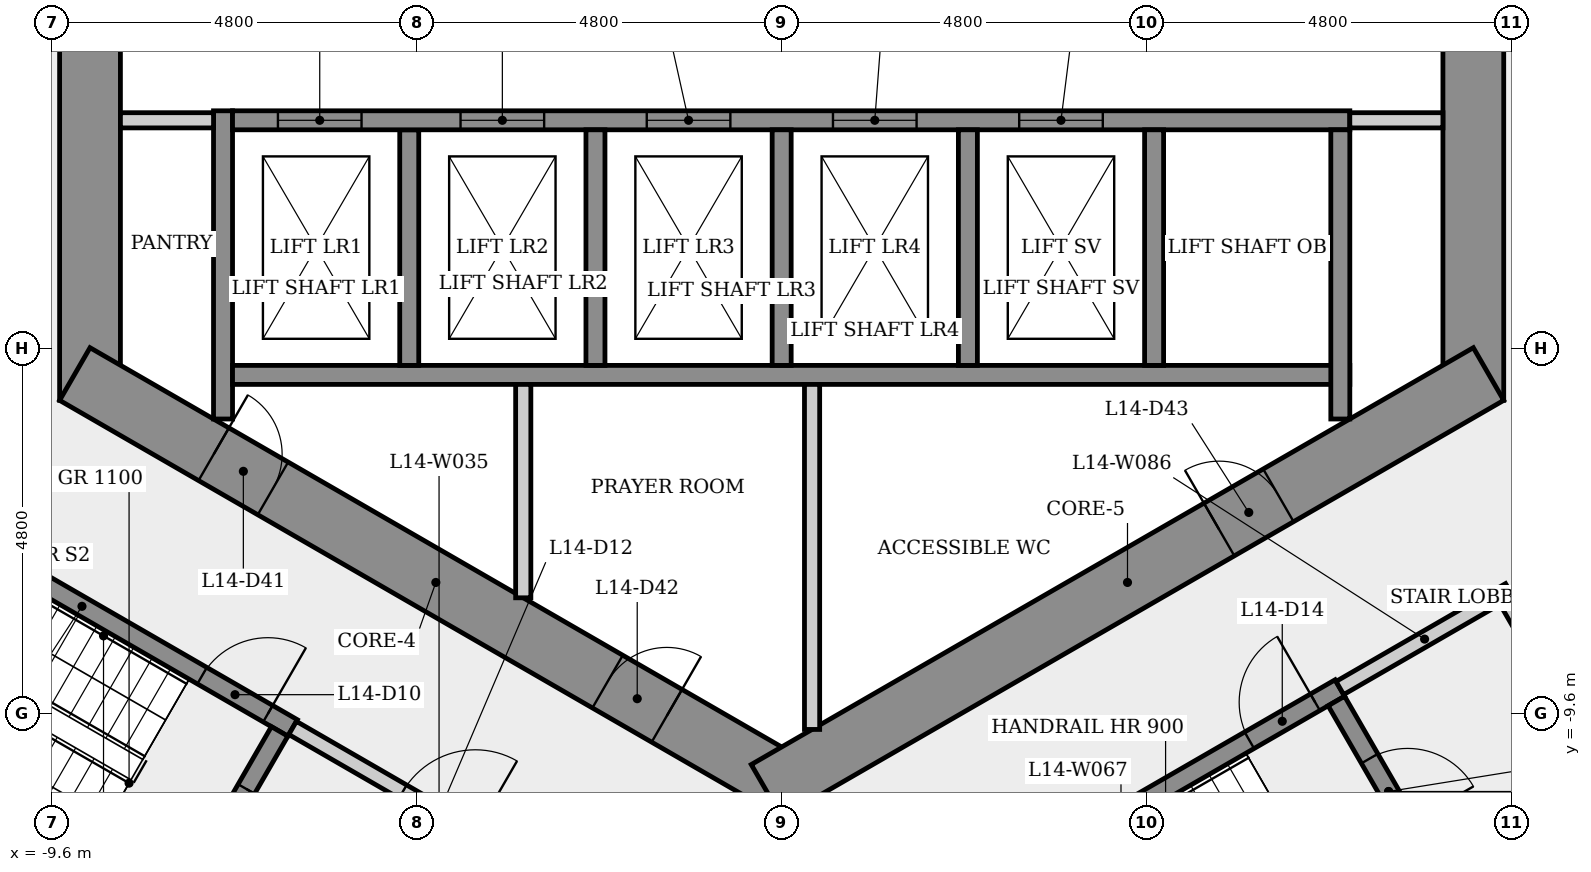
"""IFC4 building model, lengths in metres.
Left out: names, types, materials, properties, quantities, classifications, styles, units other than length and angle.
Written with IfcOpenShell. Run it as: python <this file> out.ifc"""

import sys

from ifc_helpers import new_model, si_unit, direction, frame, frame_2d, origin, place, context, subcontext, project, spatial, rectangle, extrude, element, fill, save


model = new_model("IFC4")
c1 = context("Model", 3, precision=1e-05, world=origin(), true_north=direction((0.0, 1.0)))
c2 = subcontext(c1, "Body", "Model", "MODEL_VIEW")
j1 = project(units=[si_unit("LENGTHUNIT", "METRE"), si_unit("PLANEANGLEUNIT", "RADIAN")], contexts=[c1])
p1 = place(None, origin())
s1 = spatial("IfcSite", under=j1, at=p1, CompositionType="ELEMENT")
p2 = place(p1, origin())
s2 = spatial("IfcBuilding", under=s1, at=p2, CompositionType="ELEMENT")
p3 = place(p2, frame((0.0, 0.0, 56.1)))
s3 = spatial("IfcBuildingStorey", under=s2, at=p3, CompositionType="ELEMENT", Elevation=56.1)
p4 = place(p3, frame((9.1, -5.485, 0.0), z_axis=(0.0, 0.0, 1.0), x_axis=(0.0, 1.0, 0.0)))
e1 = element("IfcWall", 1, at=p4, inside=s3, PredefinedType="SHEAR", context=c2, shape_type="SweptSolid", body=[
    extrude(rectangle(XDim=10.97, YDim=0.8, at=frame_2d((5.485, 0.0))), origin(), (0.0, 0.0, 1.0), 3.4),
])
p5 = place(p4, frame((4.685, 0.0, 0.0)))
e2 = element("IfcOpeningElement", 2, at=p5, cuts=e1, PredefinedType="OPENING", context=c2, shape_type="SweptSolid", body=[
    extrude(rectangle(XDim=1.6, YDim=2.1, at=frame_2d((0.8, 1.05))), frame((0.0, 0.41, 0.0), z_axis=(0.0, -1.0, 0.0), x_axis=(1.0, 0.0, 0.0)), (0.0, 0.0, 1.0), 0.82),
])
p6 = place(p3, frame((-9.1, 5.485, 0.0), z_axis=(0.0, 0.0, 1.0), x_axis=(0.0, -1.0, 0.0)))
e3 = element("IfcWall", 3, at=p6, inside=s3, PredefinedType="SHEAR", context=c2, shape_type="SweptSolid", body=[
    extrude(rectangle(XDim=10.97, YDim=0.8, at=frame_2d((5.485, 0.0))), origin(), (0.0, 0.0, 1.0), 3.4),
])
p7 = place(p6, frame((4.685, 0.0, 0.0)))
e4 = element("IfcOpeningElement", 4, at=p7, cuts=e3, PredefinedType="OPENING", context=c2, shape_type="SweptSolid", body=[
    extrude(rectangle(XDim=1.6, YDim=2.1, at=frame_2d((0.8, 1.05))), frame((0.0, 0.41, 0.0), z_axis=(0.0, -1.0, 0.0), x_axis=(1.0, 0.0, 0.0)), (0.0, 0.0, 1.0), 0.82),
])
p8 = place(p3, frame((-9.3, -5.138, 0.0), z_axis=(0.0, 0.0, 1.0), x_axis=(0.866023993627, -0.500002442456, 0.0)))
e5 = element("IfcWall", 5, at=p8, inside=s3, PredefinedType="SHEAR", context=c2, shape_type="SweptSolid", body=[
    extrude(rectangle(XDim=10.97, YDim=0.8, at=frame_2d((5.485, 0.0))), origin(), (0.0, 0.0, 1.0), 3.4),
])
p9 = place(p8, frame((2.11, 0.0, 0.0)))
e6 = element("IfcOpeningElement", 6, at=p9, cuts=e5, PredefinedType="OPENING", context=c2, shape_type="SweptSolid", body=[
    extrude(rectangle(XDim=0.9, YDim=2.1, at=frame_2d((0.45, 1.05))), frame((0.0, 0.41, 0.0), z_axis=(0.0, -1.0, 0.0), x_axis=(1.0, 0.0, 0.0)), (0.0, 0.0, 1.0), 0.82),
])
p10 = place(p8, frame((8.094, 0.0, 0.0)))
e7 = element("IfcOpeningElement", 7, at=p10, cuts=e5, PredefinedType="OPENING", context=c2, shape_type="SweptSolid", body=[
    extrude(rectangle(XDim=0.9, YDim=2.1, at=frame_2d((0.45, 1.05))), frame((0.0, 0.41, 0.0), z_axis=(0.0, -1.0, 0.0), x_axis=(1.0, 0.0, 0.0)), (0.0, 0.0, 1.0), 0.82),
])
p11 = place(p3, frame((-0.2, -10.623, 0.0), z_axis=(0.0, 0.0, 1.0), x_axis=(0.866023993627, 0.500002442456, 0.0)))
e8 = element("IfcWall", 8, at=p11, inside=s3, PredefinedType="SHEAR", context=c2, shape_type="SweptSolid", body=[
    extrude(rectangle(XDim=10.97, YDim=0.8, at=frame_2d((5.485, 0.0))), origin(), (0.0, 0.0, 1.0), 3.4),
])
p12 = place(p11, frame((6.877, 0.0, 0.0)))
e9 = element("IfcOpeningElement", 9, at=p12, cuts=e8, PredefinedType="OPENING", context=c2, shape_type="SweptSolid", body=[
    extrude(rectangle(XDim=0.9, YDim=2.1, at=frame_2d((0.45, 1.05))), frame((0.0, 0.41, 0.0), z_axis=(0.0, -1.0, 0.0), x_axis=(1.0, 0.0, 0.0)), (0.0, 0.0, 1.0), 0.82),
])
p13 = place(p3, frame((-11.977, -6.595, 0.0), z_axis=(0.0, 0.0, 1.0), x_axis=(0.866025499775, -0.499999833739, 0.0)))
e10 = element("IfcWall", 10, at=p13, inside=s3, PredefinedType="SHEAR", context=c2, shape_type="SweptSolid", body=[
    extrude(rectangle(XDim=6.4, YDim=0.25, at=frame_2d((3.2, 0.0))), origin(), (0.0, 0.0, 1.0), 3.05),
])
p14 = place(p13, frame((5.025, 0.0, 0.0)))
e11 = element("IfcOpeningElement", 11, at=p14, cuts=e10, PredefinedType="OPENING", context=c2, shape_type="SweptSolid", body=[
    extrude(rectangle(XDim=1.0, YDim=2.1, at=frame_2d((0.5, 1.05))), frame((0.0, 0.135, 0.0), z_axis=(0.0, -1.0, 0.0), x_axis=(1.0, 0.0, 0.0)), (0.0, 0.0, 1.0), 0.27),
])
p15 = place(p3, frame((-7.935, -12.393, 0.0), z_axis=(0.0, 0.0, 1.0), x_axis=(-0.866025499775, 0.499999833739, 0.0)))
e12 = element("IfcWall", 12, at=p15, inside=s3, PredefinedType="SHEAR", context=c2, shape_type="SweptSolid", body=[
    extrude(rectangle(XDim=6.4, YDim=0.25, at=frame_2d((3.2, 0.0))), origin(), (0.0, 0.0, 1.0), 3.05),
])
p16 = place(p3, frame((-7.35, -5.73, 0.0), z_axis=(0.0, 0.0, 1.0), x_axis=(0.0, 1.0, 0.0)))
e13 = element("IfcWall", 13, at=p16, inside=s3, PredefinedType="SHEAR", context=c2, shape_type="SweptSolid", body=[
    extrude(rectangle(XDim=4.055, YDim=0.25, at=frame_2d((2.028, 0.0))), origin(), (0.0, 0.0, 1.0), 3.05),
])
p17 = place(p3, frame((-7.475, -1.8, 0.0), z_axis=(0.0, 0.0, 1.0), x_axis=(-1.0, 0.0, 0.0)))
e14 = element("IfcWall", 14, at=p17, inside=s3, PredefinedType="PARTITIONING", context=c2, shape_type="SweptSolid", body=[
    extrude(rectangle(XDim=1.225, YDim=0.2, at=frame_2d((0.613, 0.0))), origin(), (0.0, 0.0, 1.0), 3.05),
])
p18 = place(p3, frame((-6.605, -9.841, 0.0), z_axis=(0.0, 0.0, 1.0), x_axis=(-0.499996545922, -0.866027397988, 0.0)))
e15 = element("IfcWall", 15, at=p18, inside=s3, PredefinedType="SHEAR", context=c2, shape_type="SweptSolid", body=[
    extrude(rectangle(XDim=2.75, YDim=0.25, at=frame_2d((1.375, 0.0))), origin(), (0.0, 0.0, 1.0), 3.05),
])
p19 = place(p18, frame((0.875, 0.0, 0.0)))
e16 = element("IfcOpeningElement", 16, at=p19, cuts=e15, PredefinedType="OPENING", context=c2, shape_type="SweptSolid", body=[
    extrude(rectangle(XDim=1.0, YDim=2.1, at=frame_2d((0.5, 1.05))), frame((0.0, 0.135, 0.0), z_axis=(0.0, -1.0, 0.0), x_axis=(1.0, 0.0, 0.0)), (0.0, 0.0, 1.0), 0.27),
])
p20 = place(p3, frame((-6.435, -9.795, 0.0), z_axis=(0.0, 0.0, 1.0), x_axis=(0.866012907634, -0.500021643343, 0.0)))
e17 = element("IfcWall", 17, at=p20, inside=s3, PredefinedType="PARTITIONING", context=c2, shape_type="SweptSolid", body=[
    extrude(rectangle(XDim=4.45, YDim=0.2, at=frame_2d((2.225, 0.0))), origin(), (0.0, 0.0, 1.0), 3.05),
])
p21 = place(p20, frame((1.675, 0.0, 0.0)))
e18 = element("IfcOpeningElement", 18, at=p21, cuts=e17, PredefinedType="OPENING", context=c2, shape_type="SweptSolid", body=[
    extrude(rectangle(XDim=1.1, YDim=2.1, at=frame_2d((0.55, 1.05))), frame((0.0, 0.11, 0.0), z_axis=(0.0, -1.0, 0.0), x_axis=(1.0, 0.0, 0.0)), (0.0, 0.0, 1.0), 0.22),
])
p22 = place(p3, frame((-7.225, -5.15, 0.0), z_axis=(0.0, 0.0, 1.0), x_axis=(1.0, 0.0, 0.0)))
e19 = element("IfcWall", 19, at=p22, inside=s3, PredefinedType="SHEAR", context=c2, shape_type="SweptSolid", body=[
    extrude(rectangle(XDim=14.7, YDim=0.25, at=frame_2d((7.35, 0.0))), origin(), (0.0, 0.0, 1.0), 3.05),
])
p23 = place(p3, frame((-4.9, -1.925, 0.0), z_axis=(0.0, 0.0, 1.0), x_axis=(0.0, -1.0, 0.0)))
e20 = element("IfcWall", 20, at=p23, inside=s3, PredefinedType="SHEAR", context=c2, shape_type="SweptSolid", body=[
    extrude(rectangle(XDim=3.1, YDim=0.25, at=frame_2d((1.55, 0.0))), origin(), (0.0, 0.0, 1.0), 3.4),
])
p24 = place(p3, frame((-7.225, -1.8, 0.0), z_axis=(0.0, 0.0, 1.0), x_axis=(1.0, 0.0, 0.0)))
e21 = element("IfcWall", 21, at=p24, inside=s3, PredefinedType="SHEAR", context=c2, shape_type="SweptSolid", body=[
    extrude(rectangle(XDim=14.7, YDim=0.25, at=frame_2d((7.35, 0.0))), origin(), (0.0, 0.0, 1.0), 3.05),
])
p25 = place(p24, frame((0.597, 0.0, 0.0)))
e22 = element("IfcOpeningElement", 22, at=p25, cuts=e21, PredefinedType="OPENING", context=c2, shape_type="SweptSolid", body=[
    extrude(rectangle(XDim=1.1, YDim=2.1, at=frame_2d((0.55, 1.05))), frame((0.0, 0.135, 0.0), z_axis=(0.0, -1.0, 0.0), x_axis=(1.0, 0.0, 0.0)), (0.0, 0.0, 1.0), 0.27),
])
p26 = place(p24, frame((3.0, 0.0, 0.0)))
e23 = element("IfcOpeningElement", 23, at=p26, cuts=e21, PredefinedType="OPENING", context=c2, shape_type="SweptSolid", body=[
    extrude(rectangle(XDim=1.1, YDim=2.1, at=frame_2d((0.55, 1.05))), frame((0.0, 0.135, 0.0), z_axis=(0.0, -1.0, 0.0), x_axis=(1.0, 0.0, 0.0)), (0.0, 0.0, 1.0), 0.27),
])
p27 = place(p24, frame((5.45, 0.0, 0.0)))
e24 = element("IfcOpeningElement", 24, at=p27, cuts=e21, PredefinedType="OPENING", context=c2, shape_type="SweptSolid", body=[
    extrude(rectangle(XDim=1.1, YDim=2.1, at=frame_2d((0.55, 1.05))), frame((0.0, 0.135, 0.0), z_axis=(0.0, -1.0, 0.0), x_axis=(1.0, 0.0, 0.0)), (0.0, 0.0, 1.0), 0.27),
])
p28 = place(p24, frame((7.9, 0.0, 0.0)))
e25 = element("IfcOpeningElement", 25, at=p28, cuts=e21, PredefinedType="OPENING", context=c2, shape_type="SweptSolid", body=[
    extrude(rectangle(XDim=1.1, YDim=2.1, at=frame_2d((0.55, 1.05))), frame((0.0, 0.135, 0.0), z_axis=(0.0, -1.0, 0.0), x_axis=(1.0, 0.0, 0.0)), (0.0, 0.0, 1.0), 0.27),
])
p29 = place(p24, frame((10.35, 0.0, 0.0)))
e26 = element("IfcOpeningElement", 26, at=p29, cuts=e21, PredefinedType="OPENING", context=c2, shape_type="SweptSolid", body=[
    extrude(rectangle(XDim=1.1, YDim=2.1, at=frame_2d((0.55, 1.05))), frame((0.0, 0.135, 0.0), z_axis=(0.0, -1.0, 0.0), x_axis=(1.0, 0.0, 0.0)), (0.0, 0.0, 1.0), 0.27),
])
p30 = place(p3, frame((-3.4, -5.275, 0.0), z_axis=(0.0, 0.0, 1.0), x_axis=(0.0, -1.0, 0.0)))
e27 = element("IfcWall", 27, at=p30, inside=s3, PredefinedType="PARTITIONING", context=c2, shape_type="SweptSolid", body=[
    extrude(rectangle(XDim=2.808, YDim=0.2, at=frame_2d((1.404, 0.0))), origin(), (0.0, 0.0, 1.0), 3.05),
])
for number, where, z_axis, x_axis in (
    (28, (-2.45, -1.925, 0.0), (0.0, 0.0, 1.0), (0.0, -1.0, 0.0)),
    (29, (0.0, -1.925, 0.0), (0.0, 0.0, 1.0), (0.0, -1.0, 0.0)),
):
    element("IfcWall", number, at=place(p3, frame(where, z_axis=z_axis, x_axis=x_axis)), inside=s3, PredefinedType="SHEAR", context=c2, shape_type="SweptSolid", body=[
        extrude(rectangle(XDim=3.1, YDim=0.25, at=frame_2d((1.55, 0.0))), origin(), (0.0, 0.0, 1.0), 3.4),
    ])
p31 = place(p3, frame((0.4, -5.275, 0.0), z_axis=(0.0, 0.0, 1.0), x_axis=(0.0, -1.0, 0.0)))
e30 = element("IfcWall", 30, at=p31, inside=s3, PredefinedType="PARTITIONING", context=c2, shape_type="SweptSolid", body=[
    extrude(rectangle(XDim=4.54, YDim=0.2, at=frame_2d((2.27, 0.0))), origin(), (0.0, 0.0, 1.0), 3.05),
])
p32 = place(p3, frame((1.585, -12.595, 0.0), z_axis=(0.0, 0.0, 1.0), x_axis=(0.866036417653, 0.499980922934, 0.0)))
e31 = element("IfcWall", 31, at=p32, inside=s3, PredefinedType="SHEAR", context=c2, shape_type="SweptSolid", body=[
    extrude(rectangle(XDim=6.65, YDim=0.25, at=frame_2d((3.325, 0.0))), origin(), (0.0, 0.0, 1.0), 3.05),
])
p33 = place(p32, frame((5.275, 0.0, 0.0)))
e32 = element("IfcOpeningElement", 32, at=p33, cuts=e31, PredefinedType="OPENING", context=c2, shape_type="SweptSolid", body=[
    extrude(rectangle(XDim=1.0, YDim=2.1, at=frame_2d((0.5, 1.05))), frame((0.0, 0.135, 0.0), z_axis=(0.0, -1.0, 0.0), x_axis=(1.0, 0.0, 0.0)), (0.0, 0.0, 1.0), 0.27),
])
for number, where, z_axis, x_axis in (
    (33, (2.45, -1.925, 0.0), (0.0, 0.0, 1.0), (0.0, -1.0, 0.0)),
    (34, (4.9, -1.925, 0.0), (0.0, 0.0, 1.0), (0.0, -1.0, 0.0)),
):
    element("IfcWall", number, at=place(p3, frame(where, z_axis=z_axis, x_axis=x_axis)), inside=s3, PredefinedType="SHEAR", context=c2, shape_type="SweptSolid", body=[
        extrude(rectangle(XDim=3.1, YDim=0.25, at=frame_2d((1.55, 0.0))), origin(), (0.0, 0.0, 1.0), 3.4),
    ])
p34 = place(p3, frame((7.298, -9.441, 0.0), z_axis=(0.0, 0.0, 1.0), x_axis=(0.500034990121, -0.866005201286, 0.0)))
e35 = element("IfcWall", 35, at=p34, inside=s3, PredefinedType="SHEAR", context=c2, shape_type="SweptSolid", body=[
    extrude(rectangle(XDim=2.75, YDim=0.25, at=frame_2d((1.375, 0.0))), origin(), (0.0, 0.0, 1.0), 3.05),
])
p35 = place(p34, frame((0.875, 0.0, 0.0)))
e36 = element("IfcOpeningElement", 36, at=p35, cuts=e35, PredefinedType="OPENING", context=c2, shape_type="SweptSolid", body=[
    extrude(rectangle(XDim=1.0, YDim=2.1, at=frame_2d((0.5, 1.05))), frame((0.0, 0.135, 0.0), z_axis=(0.0, -1.0, 0.0), x_axis=(1.0, 0.0, 0.0)), (0.0, 0.0, 1.0), 0.27),
])
p36 = place(p3, frame((7.344, -9.27, 0.0), z_axis=(0.0, 0.0, 1.0), x_axis=(0.866005588531, 0.500034319456, 0.0)))
e37 = element("IfcWall", 37, at=p36, inside=s3, PredefinedType="PARTITIONING", context=c2, shape_type="SweptSolid", body=[
    extrude(rectangle(XDim=2.575, YDim=0.2, at=frame_2d((1.288, 0.0))), origin(), (0.0, 0.0, 1.0), 3.05),
])
p37 = place(p3, frame((7.35, -1.925, 0.0), z_axis=(0.0, 0.0, 1.0), x_axis=(0.0, -1.0, 0.0)))
e38 = element("IfcWall", 38, at=p37, inside=s3, PredefinedType="SHEAR", context=c2, shape_type="SweptSolid", body=[
    extrude(rectangle(XDim=3.805, YDim=0.25, at=frame_2d((1.903, 0.0))), origin(), (0.0, 0.0, 1.0), 3.05),
])
p38 = place(p3, frame((8.7, -1.8, 0.0), z_axis=(0.0, 0.0, 1.0), x_axis=(-1.0, 0.0, 0.0)))
e39 = element("IfcWall", 39, at=p38, inside=s3, PredefinedType="PARTITIONING", context=c2, shape_type="SweptSolid", body=[
    extrude(rectangle(XDim=1.225, YDim=0.2, at=frame_2d((0.613, 0.0))), origin(), (0.0, 0.0, 1.0), 3.05),
])
p39 = place(p3, frame((9.537, -8.119, 0.0), z_axis=(0.0, 0.0, 1.0), x_axis=(0.499990139034, -0.866031096941, 0.0)))
e40 = element("IfcWall", 40, at=p39, inside=s3, PredefinedType="PARTITIONING", context=c2, shape_type="SweptSolid", body=[
    extrude(rectangle(XDim=3.0, YDim=0.2, at=frame_2d((1.5, 0.0))), origin(), (0.0, 0.0, 1.0), 3.05),
])
p40 = place(p39, frame((0.935, 0.0, 0.0)))
e41 = element("IfcOpeningElement", 41, at=p40, cuts=e40, PredefinedType="OPENING", context=c2, shape_type="SweptSolid", body=[
    extrude(rectangle(XDim=1.0, YDim=2.1, at=frame_2d((0.5, 1.05))), frame((0.0, 0.11, 0.0), z_axis=(0.0, -1.0, 0.0), x_axis=(1.0, 0.0, 0.0)), (0.0, 0.0, 1.0), 0.22),
])
p41 = place(p3, frame((10.901, -10.681, 0.0), z_axis=(0.0, 0.0, 1.0), x_axis=(-0.866009402589, -0.500027713859, 0.0)))
e42 = element("IfcWall", 42, at=p41, inside=s3, PredefinedType="PARTITIONING", context=c2, shape_type="SweptSolid", body=[
    extrude(rectangle(XDim=2.1, YDim=0.2, at=frame_2d((1.05, 0.0))), origin(), (0.0, 0.0, 1.0), 3.05),
])
p42 = place(p25, origin())
e43 = element("IfcDoor", 43, at=p42, inside=s3, OperationType="SLIDING_TO_LEFT", PredefinedType="DOOR", context=c2, shape_type="SweptSolid", body=[
    extrude(rectangle(XDim=1.1, YDim=2.1, at=frame_2d((0.55, 1.05))), frame((0.0, 0.025, 0.0), z_axis=(0.0, -1.0, 0.0), x_axis=(1.0, 0.0, 0.0)), (0.0, 0.0, 1.0), 0.05),
])
fill(e22, e43)
p43 = place(p26, origin())
e44 = element("IfcDoor", 44, at=p43, inside=s3, OperationType="SLIDING_TO_LEFT", PredefinedType="DOOR", context=c2, shape_type="SweptSolid", body=[
    extrude(rectangle(XDim=1.1, YDim=2.1, at=frame_2d((0.55, 1.05))), frame((0.0, 0.025, 0.0), z_axis=(0.0, -1.0, 0.0), x_axis=(1.0, 0.0, 0.0)), (0.0, 0.0, 1.0), 0.05),
])
fill(e23, e44)
p44 = place(p27, origin())
e45 = element("IfcDoor", 45, at=p44, inside=s3, OperationType="SLIDING_TO_LEFT", PredefinedType="DOOR", context=c2, shape_type="SweptSolid", body=[
    extrude(rectangle(XDim=1.1, YDim=2.1, at=frame_2d((0.55, 1.05))), frame((0.0, 0.025, 0.0), z_axis=(0.0, -1.0, 0.0), x_axis=(1.0, 0.0, 0.0)), (0.0, 0.0, 1.0), 0.05),
])
fill(e24, e45)
p45 = place(p28, origin())
e46 = element("IfcDoor", 46, at=p45, inside=s3, OperationType="SLIDING_TO_LEFT", PredefinedType="DOOR", context=c2, shape_type="SweptSolid", body=[
    extrude(rectangle(XDim=1.1, YDim=2.1, at=frame_2d((0.55, 1.05))), frame((0.0, 0.025, 0.0), z_axis=(0.0, -1.0, 0.0), x_axis=(1.0, 0.0, 0.0)), (0.0, 0.0, 1.0), 0.05),
])
fill(e25, e46)
p46 = place(p29, origin())
e47 = element("IfcDoor", 47, at=p46, inside=s3, OperationType="SLIDING_TO_LEFT", PredefinedType="DOOR", context=c2, shape_type="SweptSolid", body=[
    extrude(rectangle(XDim=1.1, YDim=2.1, at=frame_2d((0.55, 1.05))), frame((0.0, 0.025, 0.0), z_axis=(0.0, -1.0, 0.0), x_axis=(1.0, 0.0, 0.0)), (0.0, 0.0, 1.0), 0.05),
])
fill(e26, e47)
p47 = place(p14, origin())
e48 = element("IfcDoor", 48, at=p47, inside=s3, OperationType="SINGLE_SWING_RIGHT", PredefinedType="DOOR", context=c2, shape_type="SweptSolid", body=[
    extrude(rectangle(XDim=1.0, YDim=2.1, at=frame_2d((0.5, 1.05))), frame((0.0, 0.025, 0.0), z_axis=(0.0, -1.0, 0.0), x_axis=(1.0, 0.0, 0.0)), (0.0, 0.0, 1.0), 0.05),
])
fill(e11, e48)
p48 = place(p19, origin())
e49 = element("IfcDoor", 49, at=p48, inside=s3, OperationType="SINGLE_SWING_LEFT", PredefinedType="DOOR", context=c2, shape_type="SweptSolid", body=[
    extrude(rectangle(XDim=1.0, YDim=2.1, at=frame_2d((0.5, 1.05))), frame((0.0, 0.025, 0.0), z_axis=(0.0, -1.0, 0.0), x_axis=(1.0, 0.0, 0.0)), (0.0, 0.0, 1.0), 0.05),
])
fill(e16, e49)
p49 = place(p21, origin())
e50 = element("IfcDoor", 50, at=p49, inside=s3, OperationType="SINGLE_SWING_RIGHT", PredefinedType="DOOR", context=c2, shape_type="SweptSolid", body=[
    extrude(rectangle(XDim=1.1, YDim=2.1, at=frame_2d((0.55, 1.05))), frame((0.0, 0.025, 0.0), z_axis=(0.0, -1.0, 0.0), x_axis=(1.0, 0.0, 0.0)), (0.0, 0.0, 1.0), 0.05),
])
fill(e18, e50)
p50 = place(p33, origin())
e51 = element("IfcDoor", 51, at=p50, inside=s3, OperationType="SINGLE_SWING_RIGHT", PredefinedType="DOOR", context=c2, shape_type="SweptSolid", body=[
    extrude(rectangle(XDim=1.0, YDim=2.1, at=frame_2d((0.5, 1.05))), frame((0.0, 0.025, 0.0), z_axis=(0.0, -1.0, 0.0), x_axis=(1.0, 0.0, 0.0)), (0.0, 0.0, 1.0), 0.05),
])
fill(e32, e51)
p51 = place(p35, origin())
e52 = element("IfcDoor", 52, at=p51, inside=s3, OperationType="SINGLE_SWING_RIGHT", PredefinedType="DOOR", context=c2, shape_type="SweptSolid", body=[
    extrude(rectangle(XDim=1.0, YDim=2.1, at=frame_2d((0.5, 1.05))), frame((0.0, 0.025, 0.0), z_axis=(0.0, -1.0, 0.0), x_axis=(1.0, 0.0, 0.0)), (0.0, 0.0, 1.0), 0.05),
])
fill(e36, e52)
p52 = place(p9, origin())
e53 = element("IfcDoor", 53, at=p52, inside=s3, OperationType="SINGLE_SWING_LEFT", PredefinedType="DOOR", context=c2, shape_type="SweptSolid", body=[
    extrude(rectangle(XDim=0.9, YDim=2.1, at=frame_2d((0.45, 1.05))), frame((0.0, 0.025, 0.0), z_axis=(0.0, -1.0, 0.0), x_axis=(1.0, 0.0, 0.0)), (0.0, 0.0, 1.0), 0.05),
])
fill(e6, e53)
p53 = place(p10, origin())
e54 = element("IfcDoor", 54, at=p53, inside=s3, OperationType="SINGLE_SWING_RIGHT", PredefinedType="DOOR", context=c2, shape_type="SweptSolid", body=[
    extrude(rectangle(XDim=0.9, YDim=2.1, at=frame_2d((0.45, 1.05))), frame((0.0, 0.025, 0.0), z_axis=(0.0, -1.0, 0.0), x_axis=(1.0, 0.0, 0.0)), (0.0, 0.0, 1.0), 0.05),
])
fill(e7, e54)
p54 = place(p12, origin())
e55 = element("IfcDoor", 55, at=p54, inside=s3, OperationType="SINGLE_SWING_LEFT", PredefinedType="DOOR", context=c2, shape_type="SweptSolid", body=[
    extrude(rectangle(XDim=0.9, YDim=2.1, at=frame_2d((0.45, 1.05))), frame((0.0, 0.025, 0.0), z_axis=(0.0, -1.0, 0.0), x_axis=(1.0, 0.0, 0.0)), (0.0, 0.0, 1.0), 0.05),
])
fill(e9, e55)
save(model, sys.argv[1])
